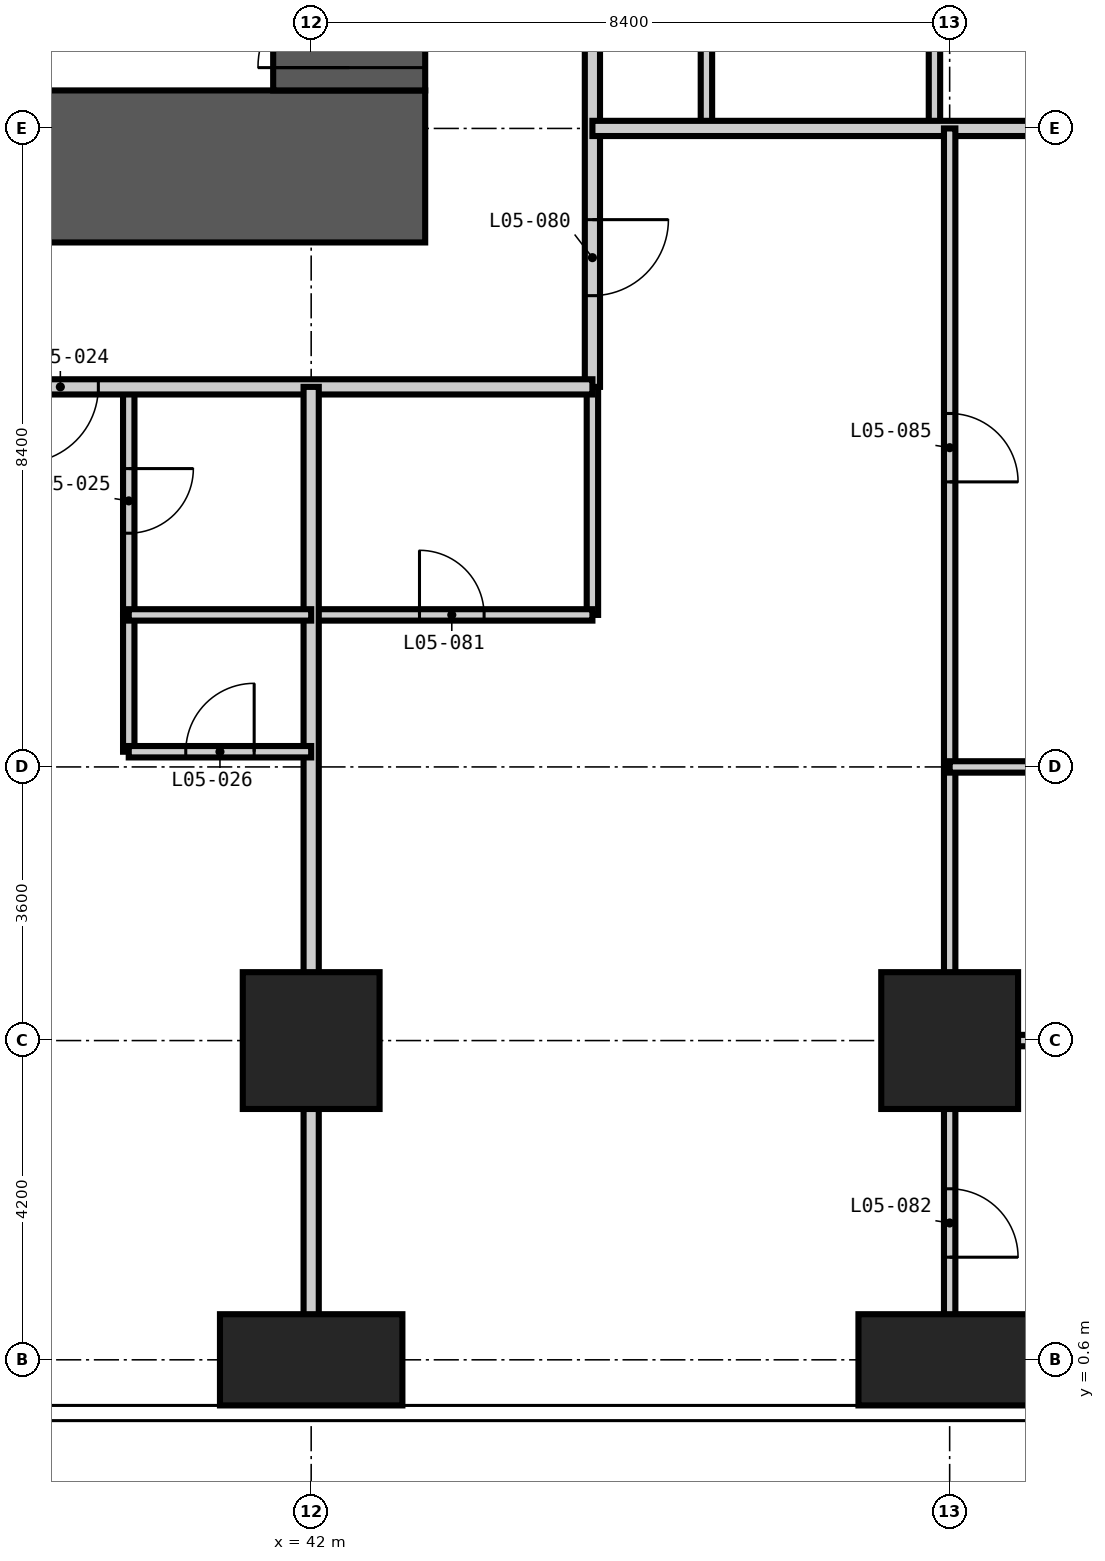
"""IFC4 building model, lengths in metres.
Left out: names, types, materials, properties, quantities, classifications, styles, units other than length and angle.
Written with IfcOpenShell. Run it as: python <this file> out.ifc"""

import sys

from ifc_helpers import new_model, si_unit, direction, frame, frame_2d, origin, origin_2d, place, context, subcontext, project, spatial, rectangle, extrude, element, fill, save


model = new_model("IFC4")
c1 = context("Model", 3, precision=1e-05, world=origin(), true_north=direction((0.0, 1.0)))
c2 = subcontext(c1, "Body", "Model", "MODEL_VIEW")
j1 = project(units=[si_unit("LENGTHUNIT", "METRE"), si_unit("PLANEANGLEUNIT", "RADIAN")], contexts=[c1])
p1 = place(None, origin())
s1 = spatial("IfcSite", under=j1, at=p1, CompositionType="ELEMENT")
p2 = place(p1, origin())
s2 = spatial("IfcBuilding", under=s1, at=p2, CompositionType="ELEMENT")
p3 = place(p2, frame((0.0, 0.0, 27.0)))
s3 = spatial("IfcBuildingStorey", under=s2, at=p3, CompositionType="ELEMENT", Elevation=27.0)
p4 = place(p3, frame((42.0, 0.6, -0.35), z_axis=(0.0, 0.0, 1.0), x_axis=(1.0, 0.0, 0.0)))
e1 = element("IfcColumn", 1, at=p4, inside=s3, PredefinedType="COLUMN", context=c2, shape_type="SweptSolid", body=[
    extrude(rectangle(XDim=2.4, YDim=1.2, at=origin_2d()), origin(), (0.0, 0.0, 1.0), 3.6),
])
p5 = place(p3, frame((42.0, 4.8, -0.35), z_axis=(0.0, 0.0, 1.0), x_axis=(1.0, 0.0, 0.0)))
e2 = element("IfcColumn", 2, at=p5, inside=s3, PredefinedType="COLUMN", context=c2, shape_type="SweptSolid", body=[
    extrude(rectangle(XDim=1.8, YDim=1.8, at=origin_2d()), origin(), (0.0, 0.0, 1.0), 3.6),
])
p6 = place(p3, frame((50.4, 0.6, -0.35), z_axis=(0.0, 0.0, 1.0), x_axis=(1.0, 0.0, 0.0)))
e3 = element("IfcColumn", 3, at=p6, inside=s3, PredefinedType="COLUMN", context=c2, shape_type="SweptSolid", body=[
    extrude(rectangle(XDim=2.4, YDim=1.2, at=origin_2d()), origin(), (0.0, 0.0, 1.0), 3.6),
])
p7 = place(p3, frame((50.4, 4.8, -0.35), z_axis=(0.0, 0.0, 1.0), x_axis=(1.0, 0.0, 0.0)))
e4 = element("IfcColumn", 4, at=p7, inside=s3, PredefinedType="COLUMN", context=c2, shape_type="SweptSolid", body=[
    extrude(rectangle(XDim=1.8, YDim=1.8, at=origin_2d()), origin(), (0.0, 0.0, 1.0), 3.6),
])
p8 = place(p3, frame((15.3, 16.3, -0.35), z_axis=(0.0, 0.0, 1.0), x_axis=(1.0, 0.0, 0.0)))
e5 = element("IfcWall", 5, at=p8, inside=s3, PredefinedType="SHEAR", context=c2, shape_type="SweptSolid", body=[
    extrude(rectangle(XDim=28.2, YDim=2.0, at=frame_2d((14.1, 0.0))), origin(), (0.0, 0.0, 1.0), 3.6),
])
p9 = place(p8, frame((13.6, 0.0, 0.35)))
e6 = element("IfcOpeningElement", 6, at=p9, cuts=e5, PredefinedType="OPENING", context=c2, shape_type="SweptSolid", body=[
    extrude(rectangle(XDim=1.0, YDim=2.1, at=frame_2d((0.5, 1.05))), frame((0.0, 1.01, 0.0), z_axis=(0.0, -1.0, 0.0), x_axis=(1.0, 0.0, 0.0)), (0.0, 0.0, 1.0), 2.02),
])
p10 = place(p8, frame((19.9, 0.0, 0.35)))
e7 = element("IfcOpeningElement", 7, at=p10, cuts=e5, PredefinedType="OPENING", context=c2, shape_type="SweptSolid", body=[
    extrude(rectangle(XDim=1.0, YDim=2.1, at=frame_2d((0.5, 1.05))), frame((0.0, 1.01, 0.0), z_axis=(0.0, -1.0, 0.0), x_axis=(1.0, 0.0, 0.0)), (0.0, 0.0, 1.0), 2.02),
])
p11 = place(p3, frame((42.5, 17.3, -0.35), z_axis=(0.0, 0.0, 1.0), x_axis=(0.0, 1.0, 0.0)))
e8 = element("IfcWall", 8, at=p11, inside=s3, PredefinedType="SHEAR", context=c2, shape_type="SweptSolid", body=[
    extrude(rectangle(XDim=24.2, YDim=2.0, at=frame_2d((12.1, 0.0))), origin(), (0.0, 0.0, 1.0), 3.6),
])
p12 = place(p11, frame((0.3, 0.0, 0.35)))
e9 = element("IfcOpeningElement", 9, at=p12, cuts=e8, PredefinedType="OPENING", context=c2, shape_type="SweptSolid", body=[
    extrude(rectangle(XDim=1.2, YDim=2.2, at=frame_2d((0.6, 1.1))), frame((0.0, 1.01, 0.0), z_axis=(0.0, -1.0, 0.0), x_axis=(1.0, 0.0, 0.0)), (0.0, 0.0, 1.0), 2.02),
])
p13 = place(p11, frame((11.6, 0.0, 0.35)))
e10 = element("IfcOpeningElement", 10, at=p13, cuts=e8, PredefinedType="OPENING", context=c2, shape_type="SweptSolid", body=[
    extrude(rectangle(XDim=1.0, YDim=2.1, at=frame_2d((0.5, 1.05))), frame((0.0, 1.01, 0.0), z_axis=(0.0, -1.0, 0.0), x_axis=(1.0, 0.0, 0.0)), (0.0, 0.0, 1.0), 2.02),
])
p14 = place(p11, frame((20.0, 0.0, 0.35)))
e11 = element("IfcOpeningElement", 11, at=p14, cuts=e8, PredefinedType="OPENING", context=c2, shape_type="SweptSolid", body=[
    extrude(rectangle(XDim=1.0, YDim=2.1, at=frame_2d((0.5, 1.05))), frame((0.0, 1.01, 0.0), z_axis=(0.0, -1.0, 0.0), x_axis=(1.0, 0.0, 0.0)), (0.0, 0.0, 1.0), 2.02),
])
p15 = place(p3, frame((39.6, 10.4, 0.0), z_axis=(0.0, 0.0, 1.0), x_axis=(0.0, 1.0, 0.0)))
e12 = element("IfcWall", 12, at=p15, inside=s3, PredefinedType="PARTITIONING", context=c2, shape_type="SweptSolid", body=[
    extrude(rectangle(XDim=3.0, YDim=0.15, at=frame_2d((1.5, 0.0))), origin(), (0.0, 0.0, 1.0), 3.25),
])
p16 = place(p15, frame((1.075, 0.0, 0.0)))
e13 = element("IfcOpeningElement", 13, at=p16, cuts=e12, PredefinedType="OPENING", context=c2, shape_type="SweptSolid", body=[
    extrude(rectangle(XDim=0.85, YDim=2.1, at=frame_2d((0.425, 1.05))), frame((0.0, 0.085, 0.0), z_axis=(0.0, -1.0, 0.0), x_axis=(1.0, 0.0, 0.0)), (0.0, 0.0, 1.0), 0.17),
])
p17 = place(p3, frame((45.7, 10.4, 0.0), z_axis=(0.0, 0.0, 1.0), x_axis=(0.0, 1.0, 0.0)))
e14 = element("IfcWall", 14, at=p17, inside=s3, PredefinedType="PARTITIONING", context=c2, shape_type="SweptSolid", body=[
    extrude(rectangle(XDim=3.0, YDim=0.15, at=frame_2d((1.5, 0.0))), origin(), (0.0, 0.0, 1.0), 3.25),
])
for number, where, z_axis, x_axis in (
    (15, (47.2, 16.8, 0.0), (0.0, 0.0, 1.0), (0.0, 1.0, 0.0)),
    (16, (50.2, 16.8, 0.0), (0.0, 0.0, 1.0), (0.0, 1.0, 0.0)),
):
    element("IfcWall", number, at=place(p3, frame(where, z_axis=z_axis, x_axis=x_axis)), inside=s3, PredefinedType="PARTITIONING", context=c2, shape_type="SweptSolid", body=[
        extrude(rectangle(XDim=2.7, YDim=0.15, at=frame_2d((1.35, 0.0))), origin(), (0.0, 0.0, 1.0), 3.25),
    ])
p18 = place(p3, frame((50.4, 4.8, 0.0), z_axis=(0.0, 0.0, 1.0), x_axis=(1.0, 0.0, 0.0)))
e17 = element("IfcWall", 17, at=p18, inside=s3, PredefinedType="PARTITIONING", context=c2, shape_type="SweptSolid", body=[
    extrude(rectangle(XDim=3.0, YDim=0.15, at=frame_2d((1.5, 0.0))), origin(), (0.0, 0.0, 1.0), 3.25),
])
p19 = place(p3, frame((42.0, 10.4, 0.0), z_axis=(0.0, 0.0, 1.0), x_axis=(1.0, 0.0, 0.0)))
e18 = element("IfcWall", 18, at=p19, inside=s3, PredefinedType="PARTITIONING", context=c2, shape_type="SweptSolid", body=[
    extrude(rectangle(XDim=3.7, YDim=0.15, at=frame_2d((1.85, 0.0))), origin(), (0.0, 0.0, 1.0), 3.25),
])
p20 = place(p19, frame((1.425, 0.0, 0.0)))
e19 = element("IfcOpeningElement", 19, at=p20, cuts=e18, PredefinedType="OPENING", context=c2, shape_type="SweptSolid", body=[
    extrude(rectangle(XDim=0.85, YDim=2.1, at=frame_2d((0.425, 1.05))), frame((0.0, 0.085, 0.0), z_axis=(0.0, -1.0, 0.0), x_axis=(1.0, 0.0, 0.0)), (0.0, 0.0, 1.0), 0.17),
])
p21 = place(p3, frame((45.7, 46.0, 0.0), z_axis=(0.0, 0.0, 1.0), x_axis=(0.0, -1.0, 0.0)))
e20 = element("IfcWall", 20, at=p21, inside=s3, PredefinedType="PARTITIONING", context=c2, shape_type="SweptSolid", body=[
    extrude(rectangle(XDim=32.6, YDim=0.2, at=frame_2d((16.3, 0.0))), origin(), (0.0, 0.0, 1.0), 3.25),
])
p22 = place(p21, frame((26.6, 0.0, 0.0)))
e21 = element("IfcOpeningElement", 21, at=p22, cuts=e20, PredefinedType="OPENING", context=c2, shape_type="SweptSolid", body=[
    extrude(rectangle(XDim=1.0, YDim=2.2, at=frame_2d((0.5, 1.1))), frame((0.0, 0.11, 0.0), z_axis=(0.0, -1.0, 0.0), x_axis=(1.0, 0.0, 0.0)), (0.0, 0.0, 1.0), 0.22),
])
p23 = place(p21, frame((22.4, 0.0, 0.0)))
e22 = element("IfcOpeningElement", 22, at=p23, cuts=e20, PredefinedType="OPENING", context=c2, shape_type="SweptSolid", body=[
    extrude(rectangle(XDim=1.0, YDim=2.2, at=frame_2d((0.5, 1.1))), frame((0.0, 0.11, 0.0), z_axis=(0.0, -1.0, 0.0), x_axis=(1.0, 0.0, 0.0)), (0.0, 0.0, 1.0), 0.22),
])
p24 = place(p21, frame((17.0, 0.0, 0.0)))
e23 = element("IfcOpeningElement", 23, at=p24, cuts=e20, PredefinedType="OPENING", context=c2, shape_type="SweptSolid", body=[
    extrude(rectangle(XDim=1.0, YDim=2.2, at=frame_2d((0.5, 1.1))), frame((0.0, 0.11, 0.0), z_axis=(0.0, -1.0, 0.0), x_axis=(1.0, 0.0, 0.0)), (0.0, 0.0, 1.0), 0.22),
])
p25 = place(p21, frame((15.2, 0.0, 0.0)))
e24 = element("IfcOpeningElement", 24, at=p25, cuts=e20, PredefinedType="OPENING", context=c2, shape_type="SweptSolid", body=[
    extrude(rectangle(XDim=1.0, YDim=2.2, at=frame_2d((0.5, 1.1))), frame((0.0, 0.11, 0.0), z_axis=(0.0, -1.0, 0.0), x_axis=(1.0, 0.0, 0.0)), (0.0, 0.0, 1.0), 0.22),
])
p26 = place(p21, frame((8.6, 0.0, 0.0)))
e25 = element("IfcOpeningElement", 25, at=p26, cuts=e20, PredefinedType="OPENING", context=c2, shape_type="SweptSolid", body=[
    extrude(rectangle(XDim=1.0, YDim=2.2, at=frame_2d((0.5, 1.1))), frame((0.0, 0.11, 0.0), z_axis=(0.0, -1.0, 0.0), x_axis=(1.0, 0.0, 0.0)), (0.0, 0.0, 1.0), 0.22),
])
p27 = place(p21, frame((6.8, 0.0, 0.0)))
e26 = element("IfcOpeningElement", 26, at=p27, cuts=e20, PredefinedType="OPENING", context=c2, shape_type="SweptSolid", body=[
    extrude(rectangle(XDim=1.0, YDim=2.2, at=frame_2d((0.5, 1.1))), frame((0.0, 0.11, 0.0), z_axis=(0.0, -1.0, 0.0), x_axis=(1.0, 0.0, 0.0)), (0.0, 0.0, 1.0), 0.22),
])
p28 = place(p21, frame((30.4, 0.0, 0.0)))
e27 = element("IfcOpeningElement", 27, at=p28, cuts=e20, PredefinedType="OPENING", context=c2, shape_type="SweptSolid", body=[
    extrude(rectangle(XDim=1.0, YDim=2.2, at=frame_2d((0.5, 1.1))), frame((0.0, 0.11, 0.0), z_axis=(0.0, -1.0, 0.0), x_axis=(1.0, 0.0, 0.0)), (0.0, 0.0, 1.0), 0.22),
])
p29 = place(p21, frame((1.5, 0.0, 0.0)))
e28 = element("IfcOpeningElement", 28, at=p29, cuts=e20, PredefinedType="OPENING", context=c2, shape_type="SweptSolid", body=[
    extrude(rectangle(XDim=1.0, YDim=2.2, at=frame_2d((0.5, 1.1))), frame((0.0, 0.11, 0.0), z_axis=(0.0, -1.0, 0.0), x_axis=(1.0, 0.0, 0.0)), (0.0, 0.0, 1.0), 0.22),
])
p30 = place(p3, frame((45.7, 13.4, 0.0), z_axis=(0.0, 0.0, 1.0), x_axis=(-1.0, 0.0, 0.0)))
e29 = element("IfcWall", 29, at=p30, inside=s3, PredefinedType="PARTITIONING", context=c2, shape_type="SweptSolid", body=[
    extrude(rectangle(XDim=32.3, YDim=0.2, at=frame_2d((16.15, 0.0))), origin(), (0.0, 0.0, 1.0), 3.25),
])
p31 = place(p30, frame((25.1, 0.0, 0.0)))
e30 = element("IfcOpeningElement", 30, at=p31, cuts=e29, PredefinedType="OPENING", context=c2, shape_type="SweptSolid", body=[
    extrude(rectangle(XDim=1.0, YDim=2.2, at=frame_2d((0.5, 1.1))), frame((0.0, 0.11, 0.0), z_axis=(0.0, -1.0, 0.0), x_axis=(1.0, 0.0, 0.0)), (0.0, 0.0, 1.0), 0.22),
])
p32 = place(p30, frame((23.3, 0.0, 0.0)))
e31 = element("IfcOpeningElement", 31, at=p32, cuts=e29, PredefinedType="OPENING", context=c2, shape_type="SweptSolid", body=[
    extrude(rectangle(XDim=1.0, YDim=2.2, at=frame_2d((0.5, 1.1))), frame((0.0, 0.11, 0.0), z_axis=(0.0, -1.0, 0.0), x_axis=(1.0, 0.0, 0.0)), (0.0, 0.0, 1.0), 0.22),
])
p33 = place(p30, frame((16.7, 0.0, 0.0)))
e32 = element("IfcOpeningElement", 32, at=p33, cuts=e29, PredefinedType="OPENING", context=c2, shape_type="SweptSolid", body=[
    extrude(rectangle(XDim=1.0, YDim=2.2, at=frame_2d((0.5, 1.1))), frame((0.0, 0.11, 0.0), z_axis=(0.0, -1.0, 0.0), x_axis=(1.0, 0.0, 0.0)), (0.0, 0.0, 1.0), 0.22),
])
p34 = place(p30, frame((14.9, 0.0, 0.0)))
e33 = element("IfcOpeningElement", 33, at=p34, cuts=e29, PredefinedType="OPENING", context=c2, shape_type="SweptSolid", body=[
    extrude(rectangle(XDim=1.0, YDim=2.2, at=frame_2d((0.5, 1.1))), frame((0.0, 0.11, 0.0), z_axis=(0.0, -1.0, 0.0), x_axis=(1.0, 0.0, 0.0)), (0.0, 0.0, 1.0), 0.22),
])
p35 = place(p30, frame((8.3, 0.0, 0.0)))
e34 = element("IfcOpeningElement", 34, at=p35, cuts=e29, PredefinedType="OPENING", context=c2, shape_type="SweptSolid", body=[
    extrude(rectangle(XDim=1.0, YDim=2.2, at=frame_2d((0.5, 1.1))), frame((0.0, 0.11, 0.0), z_axis=(0.0, -1.0, 0.0), x_axis=(1.0, 0.0, 0.0)), (0.0, 0.0, 1.0), 0.22),
])
p36 = place(p30, frame((6.5, 0.0, 0.0)))
e35 = element("IfcOpeningElement", 35, at=p36, cuts=e29, PredefinedType="OPENING", context=c2, shape_type="SweptSolid", body=[
    extrude(rectangle(XDim=1.0, YDim=2.2, at=frame_2d((0.5, 1.1))), frame((0.0, 0.11, 0.0), z_axis=(0.0, -1.0, 0.0), x_axis=(1.0, 0.0, 0.0)), (0.0, 0.0, 1.0), 0.22),
])
p37 = place(p3, frame((42.0, -0.008, 0.0), z_axis=(0.0, 0.0, 1.0), x_axis=(0.0, 1.0, 0.0)))
e36 = element("IfcWall", 36, at=p37, inside=s3, PredefinedType="PARTITIONING", context=c2, shape_type="SweptSolid", body=[
    extrude(rectangle(XDim=13.408, YDim=0.2, at=frame_2d((6.704, 0.0))), origin(), (0.0, 0.0, 1.0), 3.25),
])
p38 = place(p3, frame((45.7, 16.8, 0.0), z_axis=(0.0, 0.0, 1.0), x_axis=(1.0, 0.0, 0.0)))
e37 = element("IfcWall", 37, at=p38, inside=s3, PredefinedType="PARTITIONING", context=c2, shape_type="SweptSolid", body=[
    extrude(rectangle(XDim=13.108, YDim=0.2, at=frame_2d((6.554, 0.0))), origin(), (0.0, 0.0, 1.0), 3.25),
])
p39 = place(p3, frame((39.6, 8.6, 0.0), z_axis=(0.0, 0.0, 1.0), x_axis=(0.0, 1.0, 0.0)))
e38 = element("IfcWall", 38, at=p39, inside=s3, PredefinedType="PARTITIONING", context=c2, shape_type="SweptSolid", body=[
    extrude(rectangle(XDim=1.8, YDim=0.15, at=frame_2d((0.9, 0.0))), origin(), (0.0, 0.0, 1.0), 3.25),
])
p40 = place(p3, frame((50.4, -0.008, 0.0), z_axis=(0.0, 0.0, 1.0), x_axis=(0.0, 1.0, 0.0)))
e39 = element("IfcWall", 39, at=p40, inside=s3, PredefinedType="PARTITIONING", context=c2, shape_type="SweptSolid", body=[
    extrude(rectangle(XDim=16.808, YDim=0.15, at=frame_2d((8.404, 0.0))), origin(), (0.0, 0.0, 1.0), 3.25),
])
p41 = place(p40, frame((1.958, 0.0, 0.0)))
e40 = element("IfcOpeningElement", 40, at=p41, cuts=e39, PredefinedType="OPENING", context=c2, shape_type="SweptSolid", body=[
    extrude(rectangle(XDim=0.9, YDim=2.1, at=frame_2d((0.45, 1.05))), frame((0.0, 0.085, 0.0), z_axis=(0.0, -1.0, 0.0), x_axis=(1.0, 0.0, 0.0)), (0.0, 0.0, 1.0), 0.17),
])
p42 = place(p40, frame((12.158, 0.0, 0.0)))
e41 = element("IfcOpeningElement", 41, at=p42, cuts=e39, PredefinedType="OPENING", context=c2, shape_type="SweptSolid", body=[
    extrude(rectangle(XDim=0.9, YDim=2.1, at=frame_2d((0.45, 1.05))), frame((0.0, 0.085, 0.0), z_axis=(0.0, -1.0, 0.0), x_axis=(1.0, 0.0, 0.0)), (0.0, 0.0, 1.0), 0.17),
])
p43 = place(p3, frame((50.4, 8.4, 0.0), z_axis=(0.0, 0.0, 1.0), x_axis=(1.0, 0.0, 0.0)))
e42 = element("IfcWall", 42, at=p43, inside=s3, PredefinedType="PARTITIONING", context=c2, shape_type="SweptSolid", body=[
    extrude(rectangle(XDim=8.408, YDim=0.15, at=frame_2d((4.204, 0.0))), origin(), (0.0, 0.0, 1.0), 3.25),
])
p44 = place(p43, frame((4.55, 0.0, 0.0)))
e43 = element("IfcOpeningElement", 43, at=p44, cuts=e42, PredefinedType="OPENING", context=c2, shape_type="SweptSolid", body=[
    extrude(rectangle(XDim=0.9, YDim=2.1, at=frame_2d((0.45, 1.05))), frame((0.0, 0.085, 0.0), z_axis=(0.0, -1.0, 0.0), x_axis=(1.0, 0.0, 0.0)), (0.0, 0.0, 1.0), 0.17),
])
p45 = place(p3, frame((39.6, 8.6, 0.0), z_axis=(0.0, 0.0, 1.0), x_axis=(1.0, 0.0, 0.0)))
e44 = element("IfcWall", 44, at=p45, inside=s3, PredefinedType="PARTITIONING", context=c2, shape_type="SweptSolid", body=[
    extrude(rectangle(XDim=2.4, YDim=0.15, at=frame_2d((1.2, 0.0))), origin(), (0.0, 0.0, 1.0), 3.25),
])
p46 = place(p45, frame((0.75, 0.0, 0.0)))
e45 = element("IfcOpeningElement", 45, at=p46, cuts=e44, PredefinedType="OPENING", context=c2, shape_type="SweptSolid", body=[
    extrude(rectangle(XDim=0.9, YDim=2.1, at=frame_2d((0.45, 1.05))), frame((0.0, 0.085, 0.0), z_axis=(0.0, -1.0, 0.0), x_axis=(1.0, 0.0, 0.0)), (0.0, 0.0, 1.0), 0.17),
])
p47 = place(p3, frame((39.6, 10.4, 0.0), z_axis=(0.0, 0.0, 1.0), x_axis=(1.0, 0.0, 0.0)))
e46 = element("IfcWall", 46, at=p47, inside=s3, PredefinedType="PARTITIONING", context=c2, shape_type="SweptSolid", body=[
    extrude(rectangle(XDim=2.4, YDim=0.15, at=frame_2d((1.2, 0.0))), origin(), (0.0, 0.0, 1.0), 3.25),
])
p48 = place(p12, origin())
e47 = element("IfcDoor", 47, at=p48, inside=s3, OperationType="SINGLE_SWING_LEFT", PredefinedType="DOOR", context=c2, shape_type="SweptSolid", body=[
    extrude(rectangle(XDim=1.2, YDim=2.2, at=frame_2d((0.6, 1.1))), frame((0.0, 0.025, 0.0), z_axis=(0.0, -1.0, 0.0), x_axis=(1.0, 0.0, 0.0)), (0.0, 0.0, 1.0), 0.05),
])
fill(e9, e47)
p49 = place(p36, origin())
e48 = element("IfcDoor", 48, at=p49, inside=s3, OperationType="SINGLE_SWING_RIGHT", PredefinedType="DOOR", context=c2, shape_type="SweptSolid", body=[
    extrude(rectangle(XDim=1.0, YDim=2.2, at=frame_2d((0.5, 1.1))), frame((0.0, 0.025, 0.0), z_axis=(0.0, -1.0, 0.0), x_axis=(1.0, 0.0, 0.0)), (0.0, 0.0, 1.0), 0.05),
])
fill(e35, e48)
p50 = place(p16, frame((0.85, 0.0, 0.0), z_axis=(0.0, 0.0, 1.0), x_axis=(-1.0, 0.0, 0.0)))
e49 = element("IfcDoor", 49, at=p50, inside=s3, OperationType="SINGLE_SWING_LEFT", PredefinedType="DOOR", context=c2, shape_type="SweptSolid", body=[
    extrude(rectangle(XDim=0.85, YDim=2.1, at=frame_2d((0.425, 1.05))), frame((0.0, 0.025, 0.0), z_axis=(0.0, -1.0, 0.0), x_axis=(1.0, 0.0, 0.0)), (0.0, 0.0, 1.0), 0.05),
])
fill(e13, e49)
p51 = place(p46, origin())
e50 = element("IfcDoor", 50, at=p51, inside=s3, OperationType="SINGLE_SWING_RIGHT", PredefinedType="DOOR", context=c2, shape_type="SweptSolid", body=[
    extrude(rectangle(XDim=0.9, YDim=2.1, at=frame_2d((0.45, 1.05))), frame((0.0, 0.025, 0.0), z_axis=(0.0, -1.0, 0.0), x_axis=(1.0, 0.0, 0.0)), (0.0, 0.0, 1.0), 0.05),
])
fill(e45, e50)
p52 = place(p28, origin())
e51 = element("IfcDoor", 51, at=p52, inside=s3, OperationType="SINGLE_SWING_LEFT", PredefinedType="DOOR", context=c2, shape_type="SweptSolid", body=[
    extrude(rectangle(XDim=1.0, YDim=2.2, at=frame_2d((0.5, 1.1))), frame((0.0, 0.025, 0.0), z_axis=(0.0, -1.0, 0.0), x_axis=(1.0, 0.0, 0.0)), (0.0, 0.0, 1.0), 0.05),
])
fill(e27, e51)
p53 = place(p20, origin())
e52 = element("IfcDoor", 52, at=p53, inside=s3, OperationType="SINGLE_SWING_LEFT", PredefinedType="DOOR", context=c2, shape_type="SweptSolid", body=[
    extrude(rectangle(XDim=0.85, YDim=2.1, at=frame_2d((0.425, 1.05))), frame((0.0, 0.025, 0.0), z_axis=(0.0, -1.0, 0.0), x_axis=(1.0, 0.0, 0.0)), (0.0, 0.0, 1.0), 0.05),
])
fill(e19, e52)
p54 = place(p41, frame((0.9, 0.0, 0.0), z_axis=(0.0, 0.0, 1.0), x_axis=(-1.0, 0.0, 0.0)))
e53 = element("IfcDoor", 53, at=p54, inside=s3, OperationType="SINGLE_SWING_RIGHT", PredefinedType="DOOR", context=c2, shape_type="SweptSolid", body=[
    extrude(rectangle(XDim=0.9, YDim=2.1, at=frame_2d((0.45, 1.05))), frame((0.0, 0.025, 0.0), z_axis=(0.0, -1.0, 0.0), x_axis=(1.0, 0.0, 0.0)), (0.0, 0.0, 1.0), 0.05),
])
fill(e40, e53)
p55 = place(p42, frame((0.9, 0.0, 0.0), z_axis=(0.0, 0.0, 1.0), x_axis=(-1.0, 0.0, 0.0)))
e54 = element("IfcDoor", 54, at=p55, inside=s3, OperationType="SINGLE_SWING_RIGHT", PredefinedType="DOOR", context=c2, shape_type="SweptSolid", body=[
    extrude(rectangle(XDim=0.9, YDim=2.1, at=frame_2d((0.45, 1.05))), frame((0.0, 0.025, 0.0), z_axis=(0.0, -1.0, 0.0), x_axis=(1.0, 0.0, 0.0)), (0.0, 0.0, 1.0), 0.05),
])
fill(e41, e54)
save(model, sys.argv[1])
